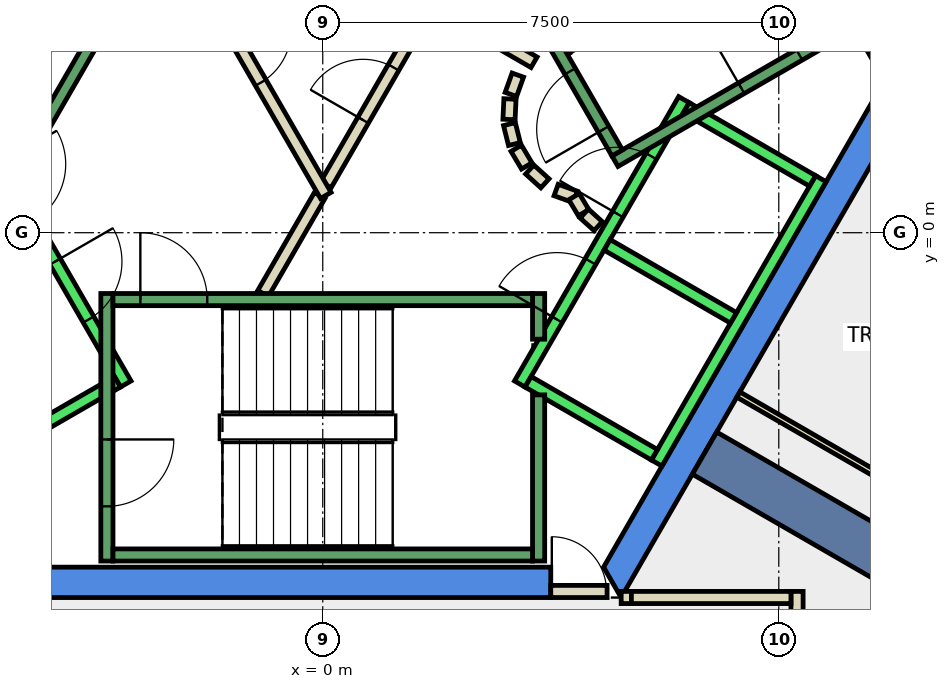
"""IFC4 building model, lengths in metres.
Left out: names, types, materials, properties, quantities, classifications, styles, units other than length and angle.
Written with IfcOpenShell. Run it as: python <this file> out.ifc"""

import sys

from ifc_helpers import new_model, si_unit, direction, frame, frame_2d, origin, place, context, subcontext, project, spatial, polyline, rectangle, outline, extrude, element, fill, save


model = new_model("IFC4")
c1 = context("Model", 3, precision=1e-05, world=origin(), true_north=direction((0.0, 1.0)))
c2 = subcontext(c1, "Body", "Model", "MODEL_VIEW")
j1 = project(units=[si_unit("LENGTHUNIT", "METRE"), si_unit("PLANEANGLEUNIT", "RADIAN")], contexts=[c1])
p1 = place(None, origin())
s1 = spatial("IfcSite", under=j1, at=p1, CompositionType="ELEMENT")
p2 = place(p1, origin())
s2 = spatial("IfcBuilding", under=s1, at=p2, CompositionType="ELEMENT")
p3 = place(p2, frame((0.0, 0.0, 304.4)))
s3 = spatial("IfcBuildingStorey", under=s2, at=p3, CompositionType="ELEMENT", Elevation=304.4)
p4 = place(p3, frame((0.0, 0.0, -0.34)))
e1 = element("IfcWall", 1, at=p4, inside=s3, PredefinedType="SHEAR", context=c2, shape_type="SweptSolid", body=[
    extrude(outline(polyline([(5.486, 9.998), (5.053, 9.748), (9.238, 2.5), (9.815, 2.5), (5.486, 9.998)])), origin(), (0.0, 0.0, 1.0), 3.6),
])
p5 = place(p3, frame((0.0, 0.0, -0.34)))
e2 = element("IfcWall", 2, at=p5, inside=s3, PredefinedType="SHEAR", context=c2, shape_type="SweptSolid", body=[
    extrude(outline(polyline([(3.75, -6.0), (3.75, -5.5), (-4.619, -5.5), (-4.907, -6.0), (3.75, -6.0)])), origin(), (0.0, 0.0, 1.0), 3.6),
])
p6 = place(p3, frame((0.0, 0.0, -0.34)))
e3 = element("IfcWall", 3, at=p6, inside=s3, PredefinedType="SHEAR", context=c2, shape_type="SweptSolid", body=[
    extrude(outline(polyline([(4.907, -6.0), (9.815, 2.5), (9.238, 2.5), (4.619, -5.5), (4.907, -6.0)])), origin(), (0.0, 0.0, 1.0), 3.6),
])
p7 = place(p3, frame((6.279, -3.625, -0.34), z_axis=(0.0, 0.0, 1.0), x_axis=(0.866017533419, -0.500013631625, 0.0)))
e4 = element("IfcWall", 4, at=p7, inside=s3, PredefinedType="SHEAR", context=c2, shape_type="SweptSolid", body=[
    extrude(rectangle(XDim=9.0, YDim=0.8, at=frame_2d((4.5, 0.0))), origin(), (0.0, 0.0, 1.0), 3.6),
])
p8 = place(p3, frame((-0.982, -1.0, 0.0), z_axis=(0.0, 0.0, 1.0), x_axis=(0.50024047865, 0.865886518847, 0.0)))
e5 = element("IfcWall", 5, at=p8, inside=s3, PredefinedType="PARTITIONING", context=c2, shape_type="SweptSolid", body=[
    extrude(rectangle(XDim=1.863, YDim=0.2, at=frame_2d((0.931, 0.0))), origin(), (0.0, 0.0, 1.0), 3.26),
])
p9 = place(p3, frame((0.05, 0.787, 0.0), z_axis=(0.0, 0.0, 1.0), x_axis=(0.499954076797, 0.866051915934, 0.0)))
e6 = element("IfcWall", 6, at=p9, inside=s3, PredefinedType="PARTITIONING", context=c2, shape_type="SweptSolid", body=[
    extrude(rectangle(XDim=3.558, YDim=0.2, at=frame_2d((1.779, 0.0))), origin(), (0.0, 0.0, 1.0), 3.26),
])
p10 = place(p9, frame((1.229, 0.0, 0.0)))
e7 = element("IfcOpeningElement", 7, at=p10, cuts=e6, PredefinedType="OPENING", context=c2, shape_type="SweptSolid", body=[
    extrude(rectangle(XDim=1.0, YDim=2.1, at=frame_2d((0.5, 1.05))), frame((0.0, 0.11, 0.0), z_axis=(0.0, -1.0, 0.0), x_axis=(1.0, 0.0, 0.0)), (0.0, 0.0, 1.0), 0.22),
])
p11 = place(p3, frame((1.866, 3.732, 0.0), z_axis=(0.0, 0.0, 1.0), x_axis=(0.866043361281, -0.499968895414, 0.0)))
e8 = element("IfcWall", 8, at=p11, inside=s3, PredefinedType="PARTITIONING", context=c2, shape_type="SweptSolid", body=[
    extrude(rectangle(XDim=1.858, YDim=0.2, at=frame_2d((0.929, 0.0))), origin(), (0.0, 0.0, 1.0), 3.26),
])
p12 = place(p3, frame((3.208, 2.592, 0.0), z_axis=(0.0, 0.0, 1.0), x_axis=(-0.337388820924, -0.941365382578, 0.0)))
e9 = element("IfcWall", 9, at=p12, inside=s3, PredefinedType="PARTITIONING", context=c2, shape_type="SweptSolid", body=[
    extrude(rectangle(XDim=0.338, YDim=0.2, at=frame_2d((0.169, 0.0))), origin(), (0.0, 0.0, 1.0), 3.26),
])
p13 = place(p3, frame((3.079, 2.199, 0.0), z_axis=(0.0, 0.0, 1.0), x_axis=(-0.047771483479, -0.998858290933, 0.0)))
e10 = element("IfcWall", 10, at=p13, inside=s3, PredefinedType="PARTITIONING", context=c2, shape_type="SweptSolid", body=[
    extrude(rectangle(XDim=0.337, YDim=0.2, at=frame_2d((0.169, 0.0))), origin(), (0.0, 0.0, 1.0), 3.26),
])
p14 = place(p3, frame((3.07, 1.786, 0.0), z_axis=(0.0, 0.0, 1.0), x_axis=(0.242705583207, -0.970099994784, 0.0)))
e11 = element("IfcWall", 11, at=p14, inside=s3, PredefinedType="PARTITIONING", context=c2, shape_type="SweptSolid", body=[
    extrude(rectangle(XDim=0.338, YDim=0.2, at=frame_2d((0.169, 0.0))), origin(), (0.0, 0.0, 1.0), 3.26),
])
for number, where, z_axis, x_axis in (
    (12, (3.182, 1.388, 0.0), (0.0, 0.0, 1.0), (0.512, -0.859, 0.0)),
    (13, (3.404, 1.039, 0.0), (0.0, 0.0, 1.0), (0.74, -0.672, 0.0)),
):
    element("IfcWall", number, at=place(p3, frame(where, z_axis=z_axis, x_axis=x_axis)), inside=s3, PredefinedType="PARTITIONING", context=c2, shape_type="SweptSolid", body=[
        extrude(rectangle(XDim=0.338, YDim=0.2, at=frame_2d((0.169, 0.0))), origin(), (0.0, 0.0, 1.0), 3.26),
    ])
p15 = place(p3, frame((3.838, 0.702, 0.0), z_axis=(0.0, 0.0, 1.0), x_axis=(0.941035081519, -0.338308993895, 0.0)))
e14 = element("IfcWall", 14, at=p15, inside=s3, PredefinedType="PARTITIONING", context=c2, shape_type="SweptSolid", body=[
    extrude(rectangle(XDim=0.337, YDim=0.2, at=frame_2d((0.168, 0.0))), origin(), (0.0, 0.0, 1.0), 3.26),
])
p16 = place(p3, frame((4.132, 0.593, 0.0), z_axis=(0.0, 0.0, 1.0), x_axis=(0.513561617048, -0.858052717201, 0.0)))
e15 = element("IfcWall", 15, at=p16, inside=s3, PredefinedType="PARTITIONING", context=c2, shape_type="SweptSolid", body=[
    extrude(rectangle(XDim=0.308, YDim=0.2, at=frame_2d((0.154, 0.0))), origin(), (0.0, 0.0, 1.0), 3.26),
])
p17 = place(p3, frame((4.301, 0.315, 0.0), z_axis=(0.0, 0.0, 1.0), x_axis=(0.741798017506, -0.670623367639, 0.0)))
e16 = element("IfcWall", 16, at=p17, inside=s3, PredefinedType="PARTITIONING", context=c2, shape_type="SweptSolid", body=[
    extrude(rectangle(XDim=0.309, YDim=0.2, at=frame_2d((0.154, 0.0))), origin(), (0.0, 0.0, 1.0), 3.26),
])
p18 = place(p3, frame((-2.54, 5.1, 0.0), z_axis=(0.0, 0.0, 1.0), x_axis=(0.499925051871, -0.866068670783, 0.0)))
e17 = element("IfcWall", 17, at=p18, inside=s3, PredefinedType="PARTITIONING", context=c2, shape_type="SweptSolid", body=[
    extrude(rectangle(XDim=5.181, YDim=0.2, at=frame_2d((2.59, 0.0))), origin(), (0.0, 0.0, 1.0), 3.26),
])
p19 = place(p18, frame((2.04, 0.0, 0.0)))
e18 = element("IfcOpeningElement", 18, at=p19, cuts=e17, PredefinedType="OPENING", context=c2, shape_type="SweptSolid", body=[
    extrude(rectangle(XDim=1.0, YDim=2.1, at=frame_2d((0.5, 1.05))), frame((0.0, 0.11, 0.0), z_axis=(0.0, -1.0, 0.0), x_axis=(1.0, 0.0, 0.0)), (0.0, 0.0, 1.0), 0.22),
])
p20 = place(p3, frame((4.908, -5.999, 0.0), z_axis=(0.0, 0.0, 1.0), x_axis=(1.0, 0.0, 0.0)))
e19 = element("IfcWall", 19, at=p20, inside=s3, PredefinedType="PARTITIONING", context=c2, shape_type="SweptSolid", body=[
    extrude(rectangle(XDim=0.168, YDim=0.2, at=frame_2d((0.084, 0.0))), origin(), (0.0, 0.0, 1.0), 2.4),
])
p21 = place(p3, frame((7.8, -5.899, 0.0), z_axis=(0.0, 0.0, 1.0), x_axis=(0.0, -1.0, 0.0)))
e20 = element("IfcWall", 20, at=p21, inside=s3, PredefinedType="PARTITIONING", context=c2, shape_type="SweptSolid", body=[
    extrude(rectangle(XDim=4.66, YDim=0.2, at=frame_2d((2.33, 0.0))), origin(), (0.0, 0.0, 1.0), 3.26),
])
p22 = place(p3, frame((6.835, -2.662, 0.0), z_axis=(0.0, 0.0, 1.0), x_axis=(0.866023427642, -0.500003422764, 0.0)))
e21 = element("IfcWall", 21, at=p22, inside=s3, PredefinedType="PARTITIONING", context=c2, shape_type="SweptSolid", body=[
    extrude(rectangle(XDim=8.65, YDim=0.1, at=frame_2d((4.325, 0.0))), origin(), (0.0, 0.0, 1.0), 3.26),
])
p23 = place(p3, frame((3.75, -5.9, 0.0), z_axis=(0.0, 0.0, 1.0), x_axis=(1.0, 0.0, 0.0)))
e22 = element("IfcWall", 22, at=p23, inside=s3, PredefinedType="PARTITIONING", context=c2, shape_type="SweptSolid", body=[
    extrude(rectangle(XDim=0.926, YDim=0.2, at=frame_2d((0.463, 0.0))), origin(), (0.0, 0.0, 1.0), 2.4),
])
p24 = place(p23, frame((0.017, 0.0, 0.0)))
e23 = element("IfcOpeningElement", 23, at=p24, cuts=e22, PredefinedType="OPENING", context=c2, shape_type="SweptSolid", body=[
    extrude(rectangle(XDim=0.9, YDim=2.1, at=frame_2d((0.45, 1.05))), frame((0.0, 0.11, 0.0), z_axis=(0.0, -1.0, 0.0), x_axis=(1.0, 0.0, 0.0)), (0.0, 0.0, 1.0), 0.22),
])
p25 = place(p3, frame((5.076, -5.999, 0.0), z_axis=(0.0, 0.0, 1.0), x_axis=(1.0, 0.0, 0.0)))
e24 = element("IfcWall", 24, at=p25, inside=s3, PredefinedType="PARTITIONING", context=c2, shape_type="SweptSolid", body=[
    extrude(rectangle(XDim=2.624, YDim=0.2, at=frame_2d((1.312, 0.0))), origin(), (0.0, 0.0, 1.0), 3.26),
])
p26 = place(p3, frame((-5.94, 2.188, 0.0), z_axis=(0.0, 0.0, 1.0), x_axis=(0.500034260056, -0.866005622828, 0.0)))
e25 = element("IfcWall", 25, at=p26, inside=s3, PredefinedType="STANDARD", context=c2, shape_type="SweptSolid", body=[
    extrude(rectangle(XDim=5.399, YDim=0.2, at=frame_2d((2.7, 0.0))), origin(), (0.0, 0.0, 1.0), 3.26),
])
p27 = place(p26, frame((3.075, 0.0, 0.0)))
e26 = element("IfcOpeningElement", 26, at=p27, cuts=e25, PredefinedType="OPENING", context=c2, shape_type="SweptSolid", body=[
    extrude(rectangle(XDim=1.1, YDim=2.1, at=frame_2d((0.55, 1.05))), frame((0.0, 0.11, 0.0), z_axis=(0.0, -1.0, 0.0), x_axis=(1.0, 0.0, 0.0)), (0.0, 0.0, 1.0), 0.22),
])
p28 = place(p26, frame((1.225, 0.0, 0.0)))
e27 = element("IfcOpeningElement", 27, at=p28, cuts=e25, PredefinedType="OPENING", context=c2, shape_type="SweptSolid", body=[
    extrude(rectangle(XDim=1.1, YDim=2.1, at=frame_2d((0.55, 1.05))), frame((0.0, 0.11, 0.0), z_axis=(0.0, -1.0, 0.0), x_axis=(1.0, 0.0, 0.0)), (0.0, 0.0, 1.0), 0.22),
])
p29 = place(p3, frame((-3.377, -2.452, 0.0), z_axis=(0.0, 0.0, 1.0), x_axis=(-0.865955154139, -0.50012165622, 0.0)))
e28 = element("IfcWall", 28, at=p29, inside=s3, PredefinedType="STANDARD", context=c2, shape_type="SweptSolid", body=[
    extrude(rectangle(XDim=2.4, YDim=0.2, at=frame_2d((1.2, 0.0))), origin(), (0.0, 0.0, 1.0), 3.26),
])
p30 = place(p3, frame((3.24, -2.488, 0.0), z_axis=(0.0, 0.0, 1.0), x_axis=(0.500034260056, 0.866005622828, 0.0)))
e29 = element("IfcWall", 29, at=p30, inside=s3, PredefinedType="STANDARD", context=c2, shape_type="SweptSolid", body=[
    extrude(rectangle(XDim=5.399, YDim=0.2, at=frame_2d((2.7, 0.0))), origin(), (0.0, 0.0, 1.0), 3.26),
])
p31 = place(p30, frame((3.225, 0.0, 0.0)))
e30 = element("IfcOpeningElement", 30, at=p31, cuts=e29, PredefinedType="OPENING", context=c2, shape_type="SweptSolid", body=[
    extrude(rectangle(XDim=1.1, YDim=2.1, at=frame_2d((0.55, 1.05))), frame((0.0, 0.11, 0.0), z_axis=(0.0, -1.0, 0.0), x_axis=(1.0, 0.0, 0.0)), (0.0, 0.0, 1.0), 0.22),
])
p32 = place(p30, frame((1.225, 0.0, 0.0)))
e31 = element("IfcOpeningElement", 31, at=p32, cuts=e29, PredefinedType="OPENING", context=c2, shape_type="SweptSolid", body=[
    extrude(rectangle(XDim=1.1, YDim=2.1, at=frame_2d((0.55, 1.05))), frame((0.0, 0.11, 0.0), z_axis=(0.0, -1.0, 0.0), x_axis=(1.0, 0.0, 0.0)), (0.0, 0.0, 1.0), 0.22),
])
p33 = place(p3, frame((5.492, -3.788, 0.0), z_axis=(0.0, 0.0, 1.0), x_axis=(0.500034260056, 0.866005622828, 0.0)))
e32 = element("IfcWall", 32, at=p33, inside=s3, PredefinedType="STANDARD", context=c2, shape_type="SweptSolid", body=[
    extrude(rectangle(XDim=5.399, YDim=0.2, at=frame_2d((2.7, 0.0))), origin(), (0.0, 0.0, 1.0), 3.26),
])
p34 = place(p3, frame((3.377, -2.452, 0.0), z_axis=(0.0, 0.0, 1.0), x_axis=(0.865955154139, -0.50012165622, 0.0)))
e33 = element("IfcWall", 33, at=p34, inside=s3, PredefinedType="STANDARD", context=c2, shape_type="SweptSolid", body=[
    extrude(rectangle(XDim=2.4, YDim=0.2, at=frame_2d((1.2, 0.0))), origin(), (0.0, 0.0, 1.0), 3.26),
])
for number, where, z_axis, x_axis in (
    (34, (4.677, -0.2, 0.0), (0.0, 0.0, 1.0), (0.866, -0.5, 0.0)),
    (35, (5.977, 2.052, 0.0), (0.0, 0.0, 1.0), (0.866, -0.5, 0.0)),
):
    element("IfcWall", number, at=place(p3, frame(where, z_axis=z_axis, x_axis=x_axis)), inside=s3, PredefinedType="STANDARD", context=c2, shape_type="SweptSolid", body=[
        extrude(rectangle(XDim=2.399, YDim=0.2, at=frame_2d((1.2, 0.0))), origin(), (0.0, 0.0, 1.0), 3.26),
    ])
p35 = place(p3, frame((-3.55, -1.0, 0.0), z_axis=(0.0, 0.0, 1.0), x_axis=(0.0, -1.0, 0.0)))
e36 = element("IfcWall", 36, at=p35, inside=s3, PredefinedType="STANDARD", context=c2, shape_type="SweptSolid", body=[
    extrude(rectangle(XDim=4.4, YDim=0.2, at=frame_2d((2.2, 0.0))), origin(), (0.0, 0.0, 1.0), 3.26),
])
p36 = place(p35, frame((2.4, 0.0, 0.0)))
e37 = element("IfcOpeningElement", 37, at=p36, cuts=e36, PredefinedType="OPENING", context=c2, shape_type="SweptSolid", body=[
    extrude(rectangle(XDim=1.1, YDim=2.2, at=frame_2d((0.55, 1.1))), frame((0.0, 0.11, 0.0), z_axis=(0.0, -1.0, 0.0), x_axis=(1.0, 0.0, 0.0)), (0.0, 0.0, 1.0), 0.22),
])
p37 = place(p3, frame((3.55, -2.667, 0.0), z_axis=(0.0, 0.0, 1.0), x_axis=(0.0, -1.0, 0.0)))
e38 = element("IfcWall", 38, at=p37, inside=s3, PredefinedType="STANDARD", context=c2, shape_type="SweptSolid", body=[
    extrude(rectangle(XDim=2.733, YDim=0.2, at=frame_2d((1.366, 0.0))), origin(), (0.0, 0.0, 1.0), 3.26),
])
p38 = place(p3, frame((3.55, -1.0, 0.0), z_axis=(0.0, 0.0, 1.0), x_axis=(0.0, -1.0, 0.0)))
e39 = element("IfcWall", 39, at=p38, inside=s3, PredefinedType="STANDARD", context=c2, shape_type="SweptSolid", body=[
    extrude(rectangle(XDim=0.751, YDim=0.2, at=frame_2d((0.375, 0.0))), origin(), (0.0, 0.0, 1.0), 3.26),
])
p39 = place(p3, frame((-3.45, -1.1, 0.0), z_axis=(0.0, 0.0, 1.0), x_axis=(1.0, 0.0, 0.0)))
e40 = element("IfcWall", 40, at=p39, inside=s3, PredefinedType="STANDARD", context=c2, shape_type="SweptSolid", body=[
    extrude(rectangle(XDim=6.9, YDim=0.2, at=frame_2d((3.45, 0.0))), origin(), (0.0, 0.0, 1.0), 3.26),
])
p40 = place(p39, frame((0.45, 0.0, 0.0)))
e41 = element("IfcOpeningElement", 41, at=p40, cuts=e40, PredefinedType="OPENING", context=c2, shape_type="SweptSolid", body=[
    extrude(rectangle(XDim=1.1, YDim=2.2, at=frame_2d((0.55, 1.1))), frame((0.0, 0.11, 0.0), z_axis=(0.0, -1.0, 0.0), x_axis=(1.0, 0.0, 0.0)), (0.0, 0.0, 1.0), 0.22),
])
p41 = place(p3, frame((-3.45, -5.3, 0.0), z_axis=(0.0, 0.0, 1.0), x_axis=(1.0, 0.0, 0.0)))
e42 = element("IfcWall", 42, at=p41, inside=s3, PredefinedType="STANDARD", context=c2, shape_type="SweptSolid", body=[
    extrude(rectangle(XDim=6.9, YDim=0.2, at=frame_2d((3.45, 0.0))), origin(), (0.0, 0.0, 1.0), 3.26),
])
p42 = place(p3, frame((4.806, 1.176, 0.0), z_axis=(0.0, 0.0, 1.0), x_axis=(0.866059941101, 0.499940174841, 0.0)))
e43 = element("IfcWall", 43, at=p42, inside=s3, PredefinedType="STANDARD", context=c2, shape_type="SweptSolid", body=[
    extrude(rectangle(XDim=4.4, YDim=0.2, at=frame_2d((2.2, 0.0))), origin(), (0.0, 0.0, 1.0), 3.26),
])
p43 = place(p42, frame((2.4, 0.0, 0.0)))
e44 = element("IfcOpeningElement", 44, at=p43, cuts=e43, PredefinedType="OPENING", context=c2, shape_type="SweptSolid", body=[
    extrude(rectangle(XDim=1.1, YDim=2.2, at=frame_2d((0.55, 1.1))), frame((0.0, 0.11, 0.0), z_axis=(0.0, -1.0, 0.0), x_axis=(1.0, 0.0, 0.0)), (0.0, 0.0, 1.0), 0.22),
])
p44 = place(p3, frame((4.843, 1.312, 0.0), z_axis=(0.0, 0.0, 1.0), x_axis=(-0.499963383562, 0.866046543262, 0.0)))
e45 = element("IfcWall", 45, at=p44, inside=s3, PredefinedType="STANDARD", context=c2, shape_type="SweptSolid", body=[
    extrude(rectangle(XDim=6.9, YDim=0.2, at=frame_2d((3.45, 0.0))), origin(), (0.0, 0.0, 1.0), 3.26),
])
p45 = place(p44, frame((0.45, 0.0, 0.0)))
e46 = element("IfcOpeningElement", 46, at=p45, cuts=e45, PredefinedType="OPENING", context=c2, shape_type="SweptSolid", body=[
    extrude(rectangle(XDim=1.1, YDim=2.2, at=frame_2d((0.55, 1.1))), frame((0.0, 0.11, 0.0), z_axis=(0.0, -1.0, 0.0), x_axis=(1.0, 0.0, 0.0)), (0.0, 0.0, 1.0), 0.22),
])
p46 = place(p3, frame((-1.393, 7.288, 0.0), z_axis=(0.0, 0.0, 1.0), x_axis=(-0.499963383562, -0.866046543262, 0.0)))
e47 = element("IfcWall", 47, at=p46, inside=s3, PredefinedType="STANDARD", context=c2, shape_type="SweptSolid", body=[
    extrude(rectangle(XDim=6.9, YDim=0.2, at=frame_2d((3.45, 0.0))), origin(), (0.0, 0.0, 1.0), 3.26),
])
p47 = place(p46, frame((0.45, 0.0, 0.0)))
e48 = element("IfcOpeningElement", 48, at=p47, cuts=e47, PredefinedType="OPENING", context=c2, shape_type="SweptSolid", body=[
    extrude(rectangle(XDim=1.1, YDim=2.2, at=frame_2d((0.55, 1.1))), frame((0.0, 0.11, 0.0), z_axis=(0.0, -1.0, 0.0), x_axis=(1.0, 0.0, 0.0)), (0.0, 0.0, 1.0), 0.22),
])
p48 = place(p10, origin())
e49 = element("IfcDoor", 49, at=p48, inside=s3, OperationType="SINGLE_SWING_RIGHT", PredefinedType="DOOR", context=c2, shape_type="SweptSolid", body=[
    extrude(rectangle(XDim=1.0, YDim=2.1, at=frame_2d((0.5, 1.05))), frame((0.0, 0.025, 0.0), z_axis=(0.0, -1.0, 0.0), x_axis=(1.0, 0.0, 0.0)), (0.0, 0.0, 1.0), 0.05),
])
fill(e7, e49)
p49 = place(p19, origin())
e50 = element("IfcDoor", 50, at=p49, inside=s3, OperationType="SINGLE_SWING_RIGHT", PredefinedType="DOOR", context=c2, shape_type="SweptSolid", body=[
    extrude(rectangle(XDim=1.0, YDim=2.1, at=frame_2d((0.5, 1.05))), frame((0.0, 0.025, 0.0), z_axis=(0.0, -1.0, 0.0), x_axis=(1.0, 0.0, 0.0)), (0.0, 0.0, 1.0), 0.05),
])
fill(e18, e50)
p50 = place(p24, origin())
e51 = element("IfcDoor", 51, at=p50, inside=s3, OperationType="SINGLE_SWING_LEFT", PredefinedType="DOOR", context=c2, shape_type="SweptSolid", body=[
    extrude(rectangle(XDim=0.9, YDim=2.1, at=frame_2d((0.45, 1.05))), frame((0.0, 0.025, 0.0), z_axis=(0.0, -1.0, 0.0), x_axis=(1.0, 0.0, 0.0)), (0.0, 0.0, 1.0), 0.05),
])
fill(e23, e51)
p51 = place(p31, origin())
e52 = element("IfcDoor", 52, at=p51, inside=s3, OperationType="SLIDING_TO_LEFT", PredefinedType="DOOR", context=c2, shape_type="SweptSolid", body=[
    extrude(rectangle(XDim=1.1, YDim=2.1, at=frame_2d((0.55, 1.05))), frame((0.0, 0.025, 0.0), z_axis=(0.0, -1.0, 0.0), x_axis=(1.0, 0.0, 0.0)), (0.0, 0.0, 1.0), 0.05),
])
fill(e30, e52)
p52 = place(p27, origin())
e53 = element("IfcDoor", 53, at=p52, inside=s3, OperationType="SLIDING_TO_LEFT", PredefinedType="DOOR", context=c2, shape_type="SweptSolid", body=[
    extrude(rectangle(XDim=1.1, YDim=2.1, at=frame_2d((0.55, 1.05))), frame((0.0, 0.025, 0.0), z_axis=(0.0, -1.0, 0.0), x_axis=(1.0, 0.0, 0.0)), (0.0, 0.0, 1.0), 0.05),
])
fill(e26, e53)
p53 = place(p32, origin())
e54 = element("IfcDoor", 54, at=p53, inside=s3, OperationType="SLIDING_TO_LEFT", PredefinedType="DOOR", context=c2, shape_type="SweptSolid", body=[
    extrude(rectangle(XDim=1.1, YDim=2.1, at=frame_2d((0.55, 1.05))), frame((0.0, 0.025, 0.0), z_axis=(0.0, -1.0, 0.0), x_axis=(1.0, 0.0, 0.0)), (0.0, 0.0, 1.0), 0.05),
])
fill(e31, e54)
p54 = place(p40, origin())
e55 = element("IfcDoor", 55, at=p54, inside=s3, OperationType="SINGLE_SWING_LEFT", PredefinedType="DOOR", context=c2, shape_type="SweptSolid", body=[
    extrude(rectangle(XDim=1.1, YDim=2.2, at=frame_2d((0.55, 1.1))), frame((0.0, 0.025, 0.0), z_axis=(0.0, -1.0, 0.0), x_axis=(1.0, 0.0, 0.0)), (0.0, 0.0, 1.0), 0.05),
])
fill(e41, e55)
p55 = place(p36, origin())
e56 = element("IfcDoor", 56, at=p55, inside=s3, OperationType="SINGLE_SWING_LEFT", PredefinedType="DOOR", context=c2, shape_type="SweptSolid", body=[
    extrude(rectangle(XDim=1.1, YDim=2.2, at=frame_2d((0.55, 1.1))), frame((0.0, 0.025, 0.0), z_axis=(0.0, -1.0, 0.0), x_axis=(1.0, 0.0, 0.0)), (0.0, 0.0, 1.0), 0.05),
])
fill(e37, e56)
p56 = place(p45, origin())
e57 = element("IfcDoor", 57, at=p56, inside=s3, OperationType="SINGLE_SWING_LEFT", PredefinedType="DOOR", context=c2, shape_type="SweptSolid", body=[
    extrude(rectangle(XDim=1.1, YDim=2.2, at=frame_2d((0.55, 1.1))), frame((0.0, 0.025, 0.0), z_axis=(0.0, -1.0, 0.0), x_axis=(1.0, 0.0, 0.0)), (0.0, 0.0, 1.0), 0.05),
])
fill(e46, e57)
p57 = place(p43, origin())
e58 = element("IfcDoor", 58, at=p57, inside=s3, OperationType="SINGLE_SWING_LEFT", PredefinedType="DOOR", context=c2, shape_type="SweptSolid", body=[
    extrude(rectangle(XDim=1.1, YDim=2.2, at=frame_2d((0.55, 1.1))), frame((0.0, 0.025, 0.0), z_axis=(0.0, -1.0, 0.0), x_axis=(1.0, 0.0, 0.0)), (0.0, 0.0, 1.0), 0.05),
])
fill(e44, e58)
save(model, sys.argv[1])
